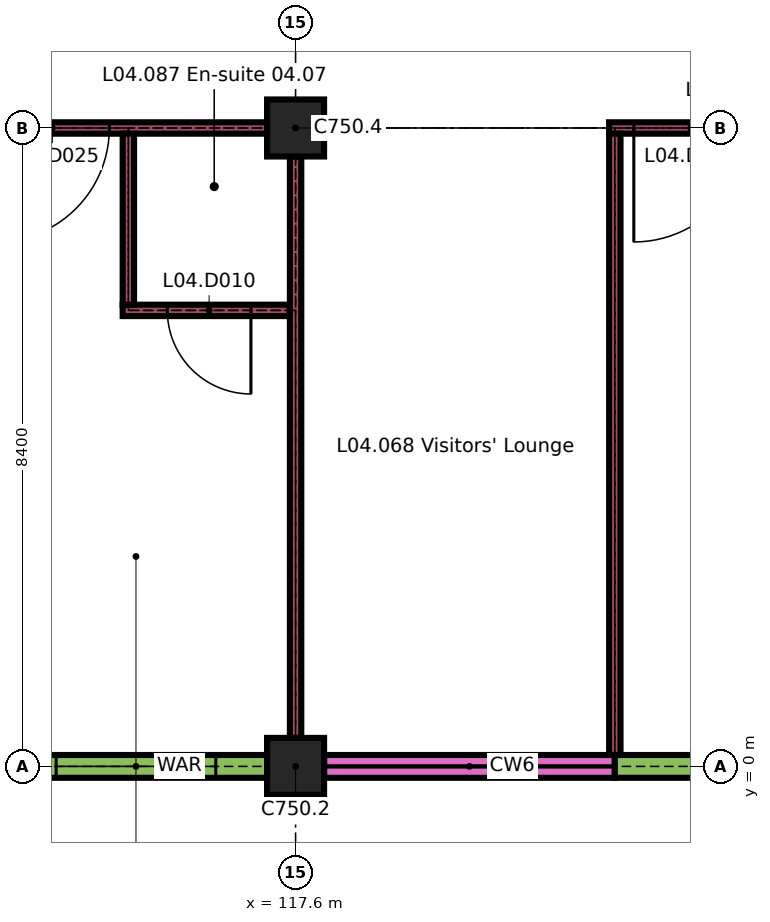
"""IFC4 building model, lengths in metres.
Left out: names, types, materials, properties, quantities, classifications, styles, units other than length and angle.
Written with IfcOpenShell. Run it as: python <this file> out.ifc"""

import sys

from ifc_helpers import new_model, si_unit, direction, frame, frame_2d, origin, origin_2d, place, context, subcontext, project, spatial, rectangle, extrude, element, fill, save


model = new_model("IFC4")
c1 = context("Model", 3, precision=1e-05, world=origin(), true_north=direction((0.0, 1.0)))
c2 = subcontext(c1, "Body", "Model", "MODEL_VIEW")
j1 = project(units=[si_unit("LENGTHUNIT", "METRE"), si_unit("PLANEANGLEUNIT", "RADIAN")], contexts=[c1])
p1 = place(None, origin())
s1 = spatial("IfcSite", under=j1, at=p1, CompositionType="ELEMENT")
p2 = place(p1, origin())
s2 = spatial("IfcBuilding", under=s1, at=p2, CompositionType="ELEMENT")
p3 = place(p2, frame((0.0, 0.0, 18.9)))
s3 = spatial("IfcBuildingStorey", under=s2, at=p3, CompositionType="ELEMENT", Elevation=18.9)
for number, where, z_axis, x_axis in (
    (1, (117.6, 0.0, 0.0), (0.0, 0.0, 1.0), (1.0, 0.0, 0.0)),
    (2, (117.6, 8.4, 0.0), (0.0, 0.0, 1.0), (1.0, 0.0, 0.0)),
):
    element("IfcColumn", number, at=place(p3, frame(where, z_axis=z_axis, x_axis=x_axis)), inside=s3, PredefinedType="COLUMN", context=c2, shape_type="SweptSolid", body=[
        extrude(rectangle(XDim=0.75, YDim=0.75, at=origin_2d()), origin(), (0.0, 0.0, 1.0), 3.26),
    ])
p4 = place(p3, frame((113.4, 0.0, 0.0), z_axis=(0.0, 0.0, 1.0), x_axis=(1.0, 0.0, 0.0)))
e3 = element("IfcWall", 3, at=p4, inside=s3, PredefinedType="SOLIDWALL", context=c2, shape_type="SweptSolid", body=[
    extrude(rectangle(XDim=3.825, YDim=0.3, at=frame_2d((1.913, 0.0))), origin(), (0.0, 0.0, 1.0), 2.96),
])
p5 = place(p4, frame((1.05, 0.0, 0.9)))
e4 = element("IfcOpeningElement", 4, at=p5, cuts=e3, PredefinedType="OPENING", context=c2, shape_type="SweptSolid", body=[
    extrude(rectangle(XDim=2.1, YDim=1.5, at=frame_2d((1.05, 0.75))), frame((0.0, 0.16, 0.0), z_axis=(0.0, -1.0, 0.0), x_axis=(1.0, 0.0, 0.0)), (0.0, 0.0, 1.0), 0.32),
])
p6 = place(p3, frame((117.975, 0.0, 0.0), z_axis=(0.0, 0.0, 1.0), x_axis=(1.0, 0.0, 0.0)))
e5 = element("IfcWall", 5, at=p6, inside=s3, PredefinedType="SOLIDWALL", context=c2, shape_type="SweptSolid", body=[
    extrude(rectangle(XDim=3.825, YDim=0.3, at=frame_2d((1.913, 0.0))), origin(), (0.0, 0.0, 1.0), 0.6),
])
p7 = place(p3, frame((121.8, 0.0, 0.0), z_axis=(0.0, 0.0, 1.0), x_axis=(1.0, 0.0, 0.0)))
e6 = element("IfcWall", 6, at=p7, inside=s3, PredefinedType="SOLIDWALL", context=c2, shape_type="SweptSolid", body=[
    extrude(rectangle(XDim=3.825, YDim=0.3, at=frame_2d((1.913, 0.0))), origin(), (0.0, 0.0, 1.0), 2.96),
])
p8 = place(p7, frame((1.05, 0.0, 0.9)))
e7 = element("IfcOpeningElement", 7, at=p8, cuts=e6, PredefinedType="OPENING", context=c2, shape_type="SweptSolid", body=[
    extrude(rectangle(XDim=2.1, YDim=1.5, at=frame_2d((1.05, 0.75))), frame((0.0, 0.16, 0.0), z_axis=(0.0, -1.0, 0.0), x_axis=(1.0, 0.0, 0.0)), (0.0, 0.0, 1.0), 0.32),
])
p9 = place(p3, frame((115.325, 6.0, 0.0), z_axis=(0.0, 0.0, 1.0), x_axis=(1.0, 0.0, 0.0)))
e8 = element("IfcWall", 8, at=p9, inside=s3, PredefinedType="PARTITIONING", context=c2, shape_type="SweptSolid", body=[
    extrude(rectangle(XDim=2.2, YDim=0.15, at=frame_2d((1.1, 0.0))), origin(), (0.0, 0.0, 1.0), 3.26),
])
p10 = place(p9, frame((0.587, 0.0, 0.0)))
e9 = element("IfcOpeningElement", 9, at=p10, cuts=e8, PredefinedType="OPENING", context=c2, shape_type="SweptSolid", body=[
    extrude(rectangle(XDim=1.1, YDim=2.1, at=frame_2d((0.55, 1.05))), frame((0.0, 0.085, 0.0), z_axis=(0.0, -1.0, 0.0), x_axis=(1.0, 0.0, 0.0)), (0.0, 0.0, 1.0), 0.17),
])
p11 = place(p3, frame((109.2, 8.4, 0.0), z_axis=(0.0, 0.0, 1.0), x_axis=(1.0, 0.0, 0.0)))
e10 = element("IfcWall", 10, at=p11, inside=s3, PredefinedType="PARTITIONING", context=c2, shape_type="SweptSolid", body=[
    extrude(rectangle(XDim=8.025, YDim=0.15, at=frame_2d((4.013, 0.0))), origin(), (0.0, 0.0, 1.0), 3.26),
])
p12 = place(p11, frame((2.45, 0.0, 0.0)))
e11 = element("IfcOpeningElement", 11, at=p12, cuts=e10, PredefinedType="OPENING", context=c2, shape_type="SweptSolid", body=[
    extrude(rectangle(XDim=1.5, YDim=2.4, at=frame_2d((0.75, 1.2))), frame((0.0, 0.085, 0.0), z_axis=(0.0, -1.0, 0.0), x_axis=(1.0, 0.0, 0.0)), (0.0, 0.0, 1.0), 0.17),
])
p13 = place(p11, frame((4.45, 0.0, 0.0)))
e12 = element("IfcOpeningElement", 12, at=p13, cuts=e10, PredefinedType="OPENING", context=c2, shape_type="SweptSolid", body=[
    extrude(rectangle(XDim=1.5, YDim=2.4, at=frame_2d((0.75, 1.2))), frame((0.0, 0.085, 0.0), z_axis=(0.0, -1.0, 0.0), x_axis=(1.0, 0.0, 0.0)), (0.0, 0.0, 1.0), 0.17),
])
p14 = place(p3, frame((121.725, 8.4, 0.0), z_axis=(0.0, 0.0, 1.0), x_axis=(1.0, 0.0, 0.0)))
e13 = element("IfcWall", 13, at=p14, inside=s3, PredefinedType="PARTITIONING", context=c2, shape_type="SweptSolid", body=[
    extrude(rectangle(XDim=3.9, YDim=0.15, at=frame_2d((1.95, 0.0))), origin(), (0.0, 0.0, 1.0), 3.26),
])
p15 = place(p14, frame((0.325, 0.0, 0.0)))
e14 = element("IfcOpeningElement", 14, at=p15, cuts=e13, PredefinedType="OPENING", context=c2, shape_type="SweptSolid", body=[
    extrude(rectangle(XDim=1.5, YDim=2.4, at=frame_2d((0.75, 1.2))), frame((0.0, 0.085, 0.0), z_axis=(0.0, -1.0, 0.0), x_axis=(1.0, 0.0, 0.0)), (0.0, 0.0, 1.0), 0.17),
])
p16 = place(p3, frame((115.4, 6.075, 0.0), z_axis=(0.0, 0.0, 1.0), x_axis=(0.0, 1.0, 0.0)))
e15 = element("IfcWall", 15, at=p16, inside=s3, PredefinedType="PARTITIONING", context=c2, shape_type="SweptSolid", body=[
    extrude(rectangle(XDim=2.25, YDim=0.15, at=frame_2d((1.125, 0.0))), origin(), (0.0, 0.0, 1.0), 3.26),
])
p17 = place(p3, frame((117.6, 0.375, 0.0), z_axis=(0.0, 0.0, 1.0), x_axis=(0.0, 1.0, 0.0)))
e16 = element("IfcWall", 16, at=p17, inside=s3, PredefinedType="PARTITIONING", context=c2, shape_type="SweptSolid", body=[
    extrude(rectangle(XDim=7.65, YDim=0.15, at=frame_2d((3.825, 0.0))), origin(), (0.0, 0.0, 1.0), 3.26),
])
p18 = place(p3, frame((121.8, 0.15, 0.0), z_axis=(0.0, 0.0, 1.0), x_axis=(0.0, 1.0, 0.0)))
e17 = element("IfcWall", 17, at=p18, inside=s3, PredefinedType="PARTITIONING", context=c2, shape_type="SweptSolid", body=[
    extrude(rectangle(XDim=8.175, YDim=0.15, at=frame_2d((4.087, 0.0))), origin(), (0.0, 0.0, 1.0), 3.26),
])
p19 = place(p5, origin())
e18 = element("IfcWindow", 18, at=p19, inside=s3, PartitioningType="DOUBLE_PANEL_VERTICAL", PredefinedType="WINDOW", context=c2, shape_type="SweptSolid", body=[
    extrude(rectangle(XDim=2.1, YDim=1.5, at=frame_2d((1.05, 0.75))), frame((0.0, 0.05, 0.0), z_axis=(0.0, -1.0, 0.0), x_axis=(1.0, 0.0, 0.0)), (0.0, 0.0, 1.0), 0.1),
])
fill(e4, e18)
p20 = place(p10, origin())
e19 = element("IfcDoor", 19, at=p20, inside=s3, OperationType="SINGLE_SWING_RIGHT", PredefinedType="DOOR", context=c2, shape_type="SweptSolid", body=[
    extrude(rectangle(XDim=1.1, YDim=2.1, at=frame_2d((0.55, 1.05))), frame((0.0, 0.025, 0.0), z_axis=(0.0, -1.0, 0.0), x_axis=(1.0, 0.0, 0.0)), (0.0, 0.0, 1.0), 0.05),
])
fill(e9, e19)
p21 = place(p13, origin())
e20 = element("IfcDoor", 20, at=p21, inside=s3, OperationType="SINGLE_SWING_LEFT", PredefinedType="DOOR", context=c2, shape_type="SweptSolid", body=[
    extrude(rectangle(XDim=1.5, YDim=2.4, at=frame_2d((0.75, 1.2))), frame((0.0, 0.03, 0.0), z_axis=(0.0, -1.0, 0.0), x_axis=(1.0, 0.0, 0.0)), (0.0, 0.0, 1.0), 0.06),
])
fill(e12, e20)
p22 = place(p15, origin())
e21 = element("IfcDoor", 21, at=p22, inside=s3, OperationType="SINGLE_SWING_LEFT", PredefinedType="DOOR", context=c2, shape_type="SweptSolid", body=[
    extrude(rectangle(XDim=1.5, YDim=2.4, at=frame_2d((0.75, 1.2))), frame((0.0, 0.03, 0.0), z_axis=(0.0, -1.0, 0.0), x_axis=(1.0, 0.0, 0.0)), (0.0, 0.0, 1.0), 0.06),
])
fill(e14, e21)
save(model, sys.argv[1])
